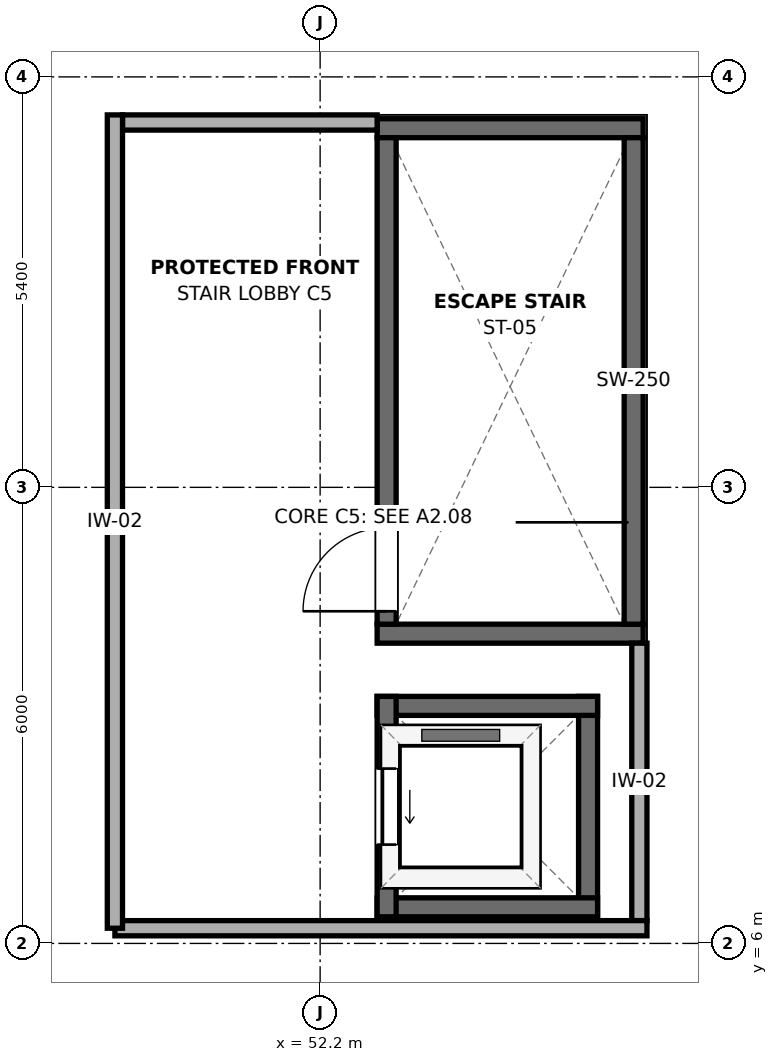
"""IFC4 building model, lengths in metres.
Left out: names, types, materials, properties, quantities, classifications, styles, units other than length and angle.
Written with IfcOpenShell. Run it as: python <this file> out.ifc"""

import sys

from ifc_helpers import new_model, si_unit, direction, frame, frame_2d, origin, place, context, subcontext, project, spatial, rectangle, extrude, element, fill, save


model = new_model("IFC4")
c1 = context("Model", 3, precision=1e-05, world=origin(), true_north=direction((0.0, 1.0)))
c2 = subcontext(c1, "Body", "Model", "MODEL_VIEW")
j1 = project(units=[si_unit("LENGTHUNIT", "METRE"), si_unit("PLANEANGLEUNIT", "RADIAN")], contexts=[c1])
p1 = place(None, origin())
s1 = spatial("IfcSite", under=j1, at=p1, CompositionType="ELEMENT")
p2 = place(p1, origin())
s2 = spatial("IfcBuilding", under=s1, at=p2, CompositionType="ELEMENT")
p3 = place(p2, frame((0.0, 0.0, 13.2)))
s3 = spatial("IfcBuildingStorey", under=s2, at=p3, CompositionType="ELEMENT", Elevation=13.2)
for number, where, z_axis, x_axis in (
    (1, (52.95, 10.075, 0.0), (0.0, 0.0, 1.0), (1.0, 0.0, 0.0)),
    (2, (52.95, 16.725, 0.0), (0.0, 0.0, 1.0), (1.0, 0.0, 0.0)),
):
    element("IfcWall", number, at=place(p3, frame(where, z_axis=z_axis, x_axis=x_axis)), inside=s3, PredefinedType="SHEAR", context=c2, shape_type="SweptSolid", body=[
        extrude(rectangle(XDim=3.5, YDim=0.25, at=frame_2d((1.75, 0.0))), origin(), (0.0, 0.0, 1.0), 2.55),
    ])
p4 = place(p3, frame((53.075, 10.2, 0.0), z_axis=(0.0, 0.0, 1.0), x_axis=(0.0, 1.0, 0.0)))
e3 = element("IfcWall", 3, at=p4, inside=s3, PredefinedType="SHEAR", context=c2, shape_type="SweptSolid", body=[
    extrude(rectangle(XDim=6.4, YDim=0.25, at=frame_2d((3.2, 0.0))), origin(), (0.0, 0.0, 1.0), 2.55),
])
p5 = place(p4, frame((0.17, 0.0, 0.0)))
e4 = element("IfcOpeningElement", 4, at=p5, cuts=e3, PredefinedType="OPENING", context=c2, shape_type="SweptSolid", body=[
    extrude(rectangle(XDim=1.1, YDim=2.15, at=frame_2d((0.55, 1.075))), frame((0.0, 0.14, 0.0), z_axis=(0.0, -1.0, 0.0), x_axis=(1.0, 0.0, 0.0)), (0.0, 0.0, 1.0), 0.28),
])
p6 = place(p3, frame((56.325, 10.2, 0.0), z_axis=(0.0, 0.0, 1.0), x_axis=(0.0, 1.0, 0.0)))
e5 = element("IfcWall", 5, at=p6, inside=s3, PredefinedType="SHEAR", context=c2, shape_type="SweptSolid", body=[
    extrude(rectangle(XDim=6.4, YDim=0.25, at=frame_2d((3.2, 0.0))), origin(), (0.0, 0.0, 1.0), 2.55),
])
p7 = place(p3, frame((49.6, 16.8, 0.0), z_axis=(0.0, 0.0, 1.0), x_axis=(1.0, 0.0, 0.0)))
e6 = element("IfcWall", 6, at=p7, inside=s3, PredefinedType="PARTITIONING", context=c2, shape_type="SweptSolid", body=[
    extrude(rectangle(XDim=3.35, YDim=0.2, at=frame_2d((1.675, 0.0))), origin(), (0.0, 0.0, 1.0), 3.7),
])
p8 = place(p3, frame((56.4, 6.3, 0.0), z_axis=(0.0, 0.0, 1.0), x_axis=(0.0, 1.0, 0.0)))
e7 = element("IfcWall", 7, at=p8, inside=s3, PredefinedType="PARTITIONING", context=c2, shape_type="SweptSolid", body=[
    extrude(rectangle(XDim=3.65, YDim=0.2, at=frame_2d((1.825, 0.0))), origin(), (0.0, 0.0, 1.0), 3.7),
])
p9 = place(p3, frame((49.5, 6.2, 0.0), z_axis=(0.0, 0.0, 1.0), x_axis=(1.0, 0.0, 0.0)))
e8 = element("IfcWall", 8, at=p9, inside=s3, PredefinedType="PARTITIONING", context=c2, shape_type="SweptSolid", body=[
    extrude(rectangle(XDim=7.0, YDim=0.2, at=frame_2d((3.5, 0.0))), origin(), (0.0, 0.0, 1.0), 3.7),
])
p10 = place(p3, frame((49.5, 16.9, 0.0), z_axis=(0.0, 0.0, 1.0), x_axis=(0.0, -1.0, 0.0)))
e9 = element("IfcWall", 9, at=p10, inside=s3, PredefinedType="PARTITIONING", context=c2, shape_type="SweptSolid", body=[
    extrude(rectangle(XDim=10.7, YDim=0.2, at=frame_2d((5.35, 0.0))), origin(), (0.0, 0.0, 1.0), 3.7),
])
p11 = place(p3, frame((55.725, 6.35, 0.0), z_axis=(0.0, 0.0, 1.0), x_axis=(0.0, 1.0, 0.0)))
e10 = element("IfcWall", 10, at=p11, inside=s3, PredefinedType="SHEAR", context=c2, shape_type="SweptSolid", body=[
    extrude(rectangle(XDim=2.9, YDim=0.25, at=frame_2d((1.45, 0.0))), origin(), (0.0, 0.0, 1.0), 3.7),
])
for number, where, z_axis, x_axis in (
    (11, (52.95, 6.475, 0.0), (0.0, 0.0, 1.0), (1.0, 0.0, 0.0)),
    (12, (52.95, 9.125, 0.0), (0.0, 0.0, 1.0), (1.0, 0.0, 0.0)),
):
    element("IfcWall", number, at=place(p3, frame(where, z_axis=z_axis, x_axis=x_axis)), inside=s3, PredefinedType="SHEAR", context=c2, shape_type="SweptSolid", body=[
        extrude(rectangle(XDim=2.9, YDim=0.25, at=frame_2d((1.45, 0.0))), origin(), (0.0, 0.0, 1.0), 3.7),
    ])
p12 = place(p3, frame((53.075, 6.35, 0.0), z_axis=(0.0, 0.0, 1.0), x_axis=(0.0, 1.0, 0.0)))
e13 = element("IfcWall", 13, at=p12, inside=s3, PredefinedType="SHEAR", context=c2, shape_type="SweptSolid", body=[
    extrude(rectangle(XDim=2.9, YDim=0.25, at=frame_2d((1.45, 0.0))), origin(), (0.0, 0.0, 1.0), 3.7),
])
p13 = place(p12, frame((0.95, 0.0, 0.0)))
e14 = element("IfcOpeningElement", 14, at=p13, cuts=e13, PredefinedType="OPENING", context=c2, shape_type="SweptSolid", body=[
    extrude(rectangle(XDim=1.0, YDim=2.15, at=frame_2d((0.5, 1.075))), frame((0.0, 0.14, 0.0), z_axis=(0.0, -1.0, 0.0), x_axis=(1.0, 0.0, 0.0)), (0.0, 0.0, 1.0), 0.28),
])
p14 = place(p5, origin())
e15 = element("IfcDoor", 15, at=p14, inside=s3, OperationType="SINGLE_SWING_LEFT", PredefinedType="DOOR", context=c2, shape_type="SweptSolid", body=[
    extrude(rectangle(XDim=1.1, YDim=2.15, at=frame_2d((0.55, 1.075))), frame((0.0, 0.025, 0.0), z_axis=(0.0, -1.0, 0.0), x_axis=(1.0, 0.0, 0.0)), (0.0, 0.0, 1.0), 0.05),
])
fill(e4, e15)
p15 = place(p13, origin())
e16 = element("IfcDoor", 16, at=p15, inside=s3, OperationType="SLIDING_TO_LEFT", PredefinedType="DOOR", context=c2, shape_type="SweptSolid", body=[
    extrude(rectangle(XDim=1.0, YDim=2.15, at=frame_2d((0.5, 1.075))), frame((0.0, 0.025, 0.0), z_axis=(0.0, -1.0, 0.0), x_axis=(1.0, 0.0, 0.0)), (0.0, 0.0, 1.0), 0.05),
])
fill(e14, e16)
save(model, sys.argv[1])
